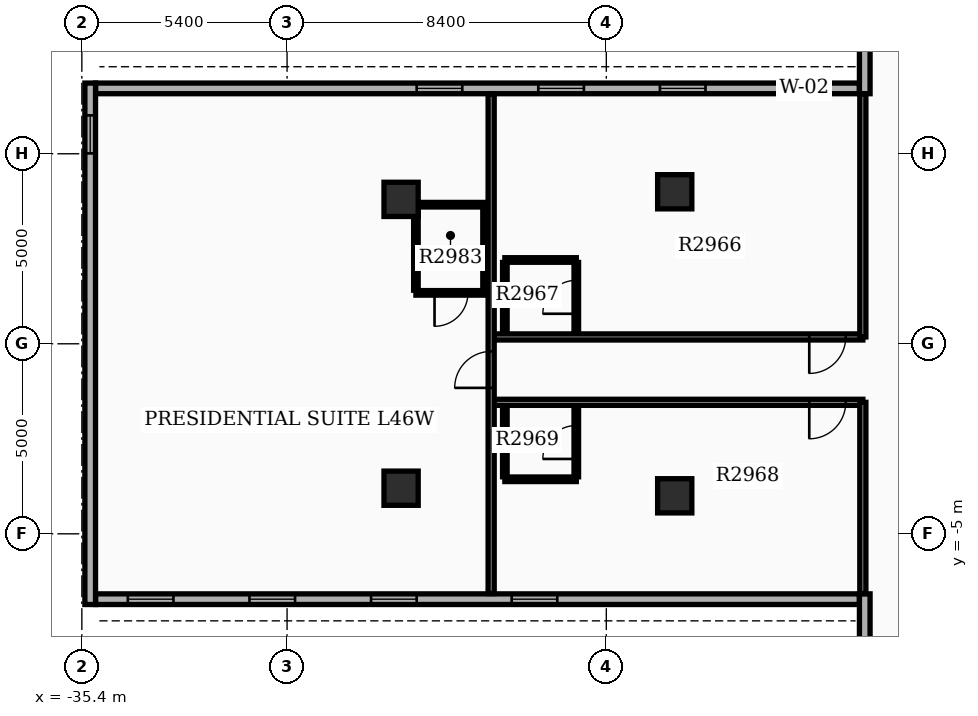
"""IFC4 building model, lengths in metres.
Left out: names, types, materials, properties, quantities, classifications, styles, units other than length and angle.
Written with IfcOpenShell. Run it as: python <this file> out.ifc"""

import sys

from ifc_helpers import new_model, si_unit, direction, frame, frame_2d, origin, origin_2d, place, context, subcontext, project, spatial, rectangle, extrude, element, fill, save


model = new_model("IFC4")
c1 = context("Model", 3, precision=1e-05, world=origin(), true_north=direction((0.0, 1.0)))
c2 = subcontext(c1, "Body", "Model", "MODEL_VIEW")
j1 = project(units=[si_unit("LENGTHUNIT", "METRE"), si_unit("PLANEANGLEUNIT", "RADIAN")], contexts=[c1])
p1 = place(None, origin())
s1 = spatial("IfcSite", under=j1, at=p1, CompositionType="ELEMENT")
p2 = place(p1, origin())
s2 = spatial("IfcBuilding", under=s1, at=p2, CompositionType="ELEMENT")
p3 = place(p2, frame((0.0, 0.0, 183.9)))
s3 = spatial("IfcBuildingStorey", under=s2, at=p3, CompositionType="ELEMENT", Elevation=183.9)
for number, where, z_axis, x_axis in (
    (1, (-19.8, -4.0, 0.0), (0.0, 0.0, 1.0), (1.0, 0.0, 0.0)),
    (2, (-19.8, 4.0, 0.0), (0.0, 0.0, 1.0), (1.0, 0.0, 0.0)),
    (3, (-27.0, -3.8, 0.0), (0.0, 0.0, 1.0), (1.0, 0.0, 0.0)),
    (4, (-27.0, 3.8, 0.0), (0.0, 0.0, 1.0), (1.0, 0.0, 0.0)),
):
    element("IfcColumn", number, at=place(p3, frame(where, z_axis=z_axis, x_axis=x_axis)), inside=s3, PredefinedType="COLUMN", context=c2, shape_type="SweptSolid", body=[
        extrude(rectangle(XDim=0.9, YDim=0.9, at=origin_2d()), origin(), (0.0, 0.0, 1.0), 3.9),
    ])
p4 = place(p3, frame((-14.94, 6.72, 0.0), z_axis=(0.0, 0.0, 1.0), x_axis=(-1.0, 0.0, 0.0)))
e5 = element("IfcWall", 5, at=p4, inside=s3, PredefinedType="STANDARD", context=c2, shape_type="SweptSolid", body=[
    extrude(rectangle(XDim=20.1, YDim=0.28, at=frame_2d((10.05, 0.0))), origin(), (0.0, 0.0, 1.0), 2.97),
])
p5 = place(p4, frame((0.85, 0.0, 0.8)))
e6 = element("IfcOpeningElement", 6, at=p5, cuts=e5, PredefinedType="OPENING", context=c2, shape_type="SweptSolid", body=[
    extrude(rectangle(XDim=1.2, YDim=1.6, at=frame_2d((0.6, 0.8))), frame((0.0, 0.15, 0.0), z_axis=(0.0, -1.0, 0.0), x_axis=(1.0, 0.0, 0.0)), (0.0, 0.0, 1.0), 0.3),
])
p6 = place(p4, frame((4.05, 0.0, 0.8)))
e7 = element("IfcOpeningElement", 7, at=p6, cuts=e5, PredefinedType="OPENING", context=c2, shape_type="SweptSolid", body=[
    extrude(rectangle(XDim=1.2, YDim=1.6, at=frame_2d((0.6, 0.8))), frame((0.0, 0.15, 0.0), z_axis=(0.0, -1.0, 0.0), x_axis=(1.0, 0.0, 0.0)), (0.0, 0.0, 1.0), 0.3),
])
p7 = place(p4, frame((7.25, 0.0, 0.8)))
e8 = element("IfcOpeningElement", 8, at=p7, cuts=e5, PredefinedType="OPENING", context=c2, shape_type="SweptSolid", body=[
    extrude(rectangle(XDim=1.2, YDim=1.6, at=frame_2d((0.6, 0.8))), frame((0.0, 0.15, 0.0), z_axis=(0.0, -1.0, 0.0), x_axis=(1.0, 0.0, 0.0)), (0.0, 0.0, 1.0), 0.3),
])
p8 = place(p4, frame((10.45, 0.0, 0.8)))
e9 = element("IfcOpeningElement", 9, at=p8, cuts=e5, PredefinedType="OPENING", context=c2, shape_type="SweptSolid", body=[
    extrude(rectangle(XDim=1.2, YDim=1.6, at=frame_2d((0.6, 0.8))), frame((0.0, 0.15, 0.0), z_axis=(0.0, -1.0, 0.0), x_axis=(1.0, 0.0, 0.0)), (0.0, 0.0, 1.0), 0.3),
])
p9 = place(p3, frame((-35.04, -6.72, 0.0), z_axis=(0.0, 0.0, 1.0), x_axis=(1.0, 0.0, 0.0)))
e10 = element("IfcWall", 10, at=p9, inside=s3, PredefinedType="STANDARD", context=c2, shape_type="SweptSolid", body=[
    extrude(rectangle(XDim=20.1, YDim=0.28, at=frame_2d((10.05, 0.0))), origin(), (0.0, 0.0, 1.0), 2.97),
])
p10 = place(p9, frame((0.85, 0.0, 0.8)))
e11 = element("IfcOpeningElement", 11, at=p10, cuts=e10, PredefinedType="OPENING", context=c2, shape_type="SweptSolid", body=[
    extrude(rectangle(XDim=1.2, YDim=1.6, at=frame_2d((0.6, 0.8))), frame((0.0, 0.15, 0.0), z_axis=(0.0, -1.0, 0.0), x_axis=(1.0, 0.0, 0.0)), (0.0, 0.0, 1.0), 0.3),
])
p11 = place(p9, frame((4.05, 0.0, 0.8)))
e12 = element("IfcOpeningElement", 12, at=p11, cuts=e10, PredefinedType="OPENING", context=c2, shape_type="SweptSolid", body=[
    extrude(rectangle(XDim=1.2, YDim=1.6, at=frame_2d((0.6, 0.8))), frame((0.0, 0.15, 0.0), z_axis=(0.0, -1.0, 0.0), x_axis=(1.0, 0.0, 0.0)), (0.0, 0.0, 1.0), 0.3),
])
p12 = place(p9, frame((7.25, 0.0, 0.8)))
e13 = element("IfcOpeningElement", 13, at=p12, cuts=e10, PredefinedType="OPENING", context=c2, shape_type="SweptSolid", body=[
    extrude(rectangle(XDim=1.2, YDim=1.6, at=frame_2d((0.6, 0.8))), frame((0.0, 0.15, 0.0), z_axis=(0.0, -1.0, 0.0), x_axis=(1.0, 0.0, 0.0)), (0.0, 0.0, 1.0), 0.3),
])
p13 = place(p9, frame((10.95, 0.0, 0.8)))
e14 = element("IfcOpeningElement", 14, at=p13, cuts=e10, PredefinedType="OPENING", context=c2, shape_type="SweptSolid", body=[
    extrude(rectangle(XDim=1.2, YDim=1.6, at=frame_2d((0.6, 0.8))), frame((0.0, 0.15, 0.0), z_axis=(0.0, -1.0, 0.0), x_axis=(1.0, 0.0, 0.0)), (0.0, 0.0, 1.0), 0.3),
])
p14 = place(p3, frame((-35.18, 6.86, 0.0), z_axis=(0.0, 0.0, 1.0), x_axis=(0.0, -1.0, 0.0)))
e15 = element("IfcWall", 15, at=p14, inside=s3, PredefinedType="STANDARD", context=c2, shape_type="SweptSolid", body=[
    extrude(rectangle(XDim=13.72, YDim=0.28, at=frame_2d((6.86, 0.0))), origin(), (0.0, 0.0, 1.0), 2.97),
])
p15 = place(p14, frame((0.85, 0.0, 0.85)))
e16 = element("IfcOpeningElement", 16, at=p15, cuts=e15, PredefinedType="OPENING", context=c2, shape_type="SweptSolid", body=[
    extrude(rectangle(XDim=1.0, YDim=1.5, at=frame_2d((0.5, 0.75))), frame((0.0, 0.15, 0.0), z_axis=(0.0, -1.0, 0.0), x_axis=(1.0, 0.0, 0.0)), (0.0, 0.0, 1.0), 0.3),
])
for number, where, z_axis, x_axis in (
    (17, (-14.8, 6.58, 0.0), (0.0, 0.0, 1.0), (0.0, 1.0, 0.0)),
    (18, (-14.8, -6.58, 0.0), (0.0, 0.0, 1.0), (0.0, -1.0, 0.0)),
):
    element("IfcWall", number, at=place(p3, frame(where, z_axis=z_axis, x_axis=x_axis)), inside=s3, PredefinedType="STANDARD", context=c2, shape_type="SweptSolid", body=[
        extrude(rectangle(XDim=6.86, YDim=0.28, at=frame_2d((3.43, 0.0))), origin(), (0.0, 0.0, 1.0), 2.97),
    ])
p16 = place(p3, frame((-14.85, 0.18, 0.0), z_axis=(0.0, 0.0, 1.0), x_axis=(-1.0, 0.0, 0.0)))
e19 = element("IfcWall", 19, at=p16, inside=s3, PredefinedType="PARTITIONING", context=c2, shape_type="SweptSolid", body=[
    extrude(rectangle(XDim=9.7, YDim=0.16, at=frame_2d((4.85, 0.0))), origin(), (0.0, 0.0, 1.0), 2.96),
])
p17 = place(p16, frame((0.45, 0.0, 0.0)))
e20 = element("IfcOpeningElement", 20, at=p17, cuts=e19, PredefinedType="OPENING", context=c2, shape_type="SweptSolid", body=[
    extrude(rectangle(XDim=0.96, YDim=2.15, at=frame_2d((0.48, 1.075))), frame((0.0, 0.09, 0.0), z_axis=(0.0, -1.0, 0.0), x_axis=(1.0, 0.0, 0.0)), (0.0, 0.0, 1.0), 0.18),
])
p18 = place(p3, frame((-14.85, 0.18, 0.0), z_axis=(0.0, 0.0, 1.0), x_axis=(0.0, 1.0, 0.0)))
e21 = element("IfcWall", 21, at=p18, inside=s3, PredefinedType="PARTITIONING", context=c2, shape_type="SweptSolid", body=[
    extrude(rectangle(XDim=6.392, YDim=0.16, at=frame_2d((3.196, 0.0))), origin(), (0.0, 0.0, 1.0), 2.96),
])
p19 = place(p3, frame((-22.39, 0.32, 0.0), z_axis=(0.0, 0.0, 1.0), x_axis=(0.0, 1.0, 0.0)))
e22 = element("IfcWall", 22, at=p19, inside=s3, PredefinedType="PARTITIONING", context=c2, shape_type="SweptSolid", body=[
    extrude(rectangle(XDim=1.82, YDim=0.12, at=frame_2d((0.91, 0.0))), origin(), (0.0, 0.0, 1.0), 2.96),
])
p20 = place(p19, frame((0.47, 0.0, 0.0)))
e23 = element("IfcOpeningElement", 23, at=p20, cuts=e22, PredefinedType="OPENING", context=c2, shape_type="SweptSolid", body=[
    extrude(rectangle(XDim=0.88, YDim=2.1, at=frame_2d((0.44, 1.05))), frame((0.0, 0.07, 0.0), z_axis=(0.0, -1.0, 0.0), x_axis=(1.0, 0.0, 0.0)), (0.0, 0.0, 1.0), 0.14),
])
p21 = place(p3, frame((-24.27, 0.32, 0.0), z_axis=(0.0, 0.0, 1.0), x_axis=(0.0, 1.0, 0.0)))
e24 = element("IfcWall", 24, at=p21, inside=s3, PredefinedType="PARTITIONING", context=c2, shape_type="SweptSolid", body=[
    extrude(rectangle(XDim=1.82, YDim=0.12, at=frame_2d((0.91, 0.0))), origin(), (0.0, 0.0, 1.0), 2.96),
])
p22 = place(p3, frame((-22.39, 2.205, 0.0), z_axis=(0.0, 0.0, 1.0), x_axis=(-1.0, 0.0, 0.0)))
e25 = element("IfcWall", 25, at=p22, inside=s3, PredefinedType="PARTITIONING", context=c2, shape_type="SweptSolid", body=[
    extrude(rectangle(XDim=1.88, YDim=0.12, at=frame_2d((0.94, 0.0))), origin(), (0.0, 0.0, 1.0), 2.96),
])
p23 = place(p3, frame((-14.85, -1.54, 0.0), z_axis=(0.0, 0.0, 1.0), x_axis=(-1.0, 0.0, 0.0)))
e26 = element("IfcWall", 26, at=p23, inside=s3, PredefinedType="PARTITIONING", context=c2, shape_type="SweptSolid", body=[
    extrude(rectangle(XDim=9.7, YDim=0.16, at=frame_2d((4.85, 0.0))), origin(), (0.0, 0.0, 1.0), 2.96),
])
p24 = place(p23, frame((0.45, 0.0, 0.0)))
e27 = element("IfcOpeningElement", 27, at=p24, cuts=e26, PredefinedType="OPENING", context=c2, shape_type="SweptSolid", body=[
    extrude(rectangle(XDim=0.96, YDim=2.15, at=frame_2d((0.48, 1.075))), frame((0.0, 0.09, 0.0), z_axis=(0.0, -1.0, 0.0), x_axis=(1.0, 0.0, 0.0)), (0.0, 0.0, 1.0), 0.18),
])
p25 = place(p3, frame((-14.85, -1.54, 0.0), z_axis=(0.0, 0.0, 1.0), x_axis=(0.0, -1.0, 0.0)))
e28 = element("IfcWall", 28, at=p25, inside=s3, PredefinedType="PARTITIONING", context=c2, shape_type="SweptSolid", body=[
    extrude(rectangle(XDim=5.032, YDim=0.16, at=frame_2d((2.516, 0.0))), origin(), (0.0, 0.0, 1.0), 2.96),
])
p26 = place(p3, frame((-22.39, -3.5, 0.0), z_axis=(0.0, 0.0, 1.0), x_axis=(0.0, 1.0, 0.0)))
e29 = element("IfcWall", 29, at=p26, inside=s3, PredefinedType="PARTITIONING", context=c2, shape_type="SweptSolid", body=[
    extrude(rectangle(XDim=1.82, YDim=0.12, at=frame_2d((0.91, 0.0))), origin(), (0.0, 0.0, 1.0), 2.96),
])
p27 = place(p26, frame((0.47, 0.0, 0.0)))
e30 = element("IfcOpeningElement", 30, at=p27, cuts=e29, PredefinedType="OPENING", context=c2, shape_type="SweptSolid", body=[
    extrude(rectangle(XDim=0.88, YDim=2.1, at=frame_2d((0.44, 1.05))), frame((0.0, 0.07, 0.0), z_axis=(0.0, -1.0, 0.0), x_axis=(1.0, 0.0, 0.0)), (0.0, 0.0, 1.0), 0.14),
])
p28 = place(p3, frame((-24.27, -3.5, 0.0), z_axis=(0.0, 0.0, 1.0), x_axis=(0.0, 1.0, 0.0)))
e31 = element("IfcWall", 31, at=p28, inside=s3, PredefinedType="PARTITIONING", context=c2, shape_type="SweptSolid", body=[
    extrude(rectangle(XDim=1.82, YDim=0.12, at=frame_2d((0.91, 0.0))), origin(), (0.0, 0.0, 1.0), 2.96),
])
p29 = place(p3, frame((-22.39, -3.565, 0.0), z_axis=(0.0, 0.0, 1.0), x_axis=(-1.0, 0.0, 0.0)))
e32 = element("IfcWall", 32, at=p29, inside=s3, PredefinedType="PARTITIONING", context=c2, shape_type="SweptSolid", body=[
    extrude(rectangle(XDim=1.88, YDim=0.12, at=frame_2d((0.94, 0.0))), origin(), (0.0, 0.0, 1.0), 2.96),
])
p30 = place(p3, frame((-24.63, -6.572, 0.0), z_axis=(0.0, 0.0, 1.0), x_axis=(0.0, 1.0, 0.0)))
e33 = element("IfcWall", 33, at=p30, inside=s3, PredefinedType="PARTITIONING", context=c2, shape_type="SweptSolid", body=[
    extrude(rectangle(XDim=13.144, YDim=0.16, at=frame_2d((6.572, 0.0))), origin(), (0.0, 0.0, 1.0), 2.96),
])
p31 = place(p30, frame((5.412, 0.0, 0.0)))
e34 = element("IfcOpeningElement", 34, at=p31, cuts=e33, PredefinedType="OPENING", context=c2, shape_type="SweptSolid", body=[
    extrude(rectangle(XDim=0.96, YDim=2.15, at=frame_2d((0.48, 1.075))), frame((0.0, 0.09, 0.0), z_axis=(0.0, -1.0, 0.0), x_axis=(1.0, 0.0, 0.0)), (0.0, 0.0, 1.0), 0.18),
])
for number, where, z_axis, x_axis in (
    (35, (-24.79, 1.41, 0.0), (0.0, 0.0, 1.0), (0.0, 1.0, 0.0)),
    (36, (-26.61, 1.41, 0.0), (0.0, 0.0, 1.0), (0.0, 1.0, 0.0)),
):
    element("IfcWall", number, at=place(p3, frame(where, z_axis=z_axis, x_axis=x_axis)), inside=s3, PredefinedType="PARTITIONING", context=c2, shape_type="SweptSolid", body=[
        extrude(rectangle(XDim=2.18, YDim=0.12, at=frame_2d((1.09, 0.0))), origin(), (0.0, 0.0, 1.0), 2.96),
    ])
p32 = place(p3, frame((-24.79, 1.34, 0.0), z_axis=(0.0, 0.0, 1.0), x_axis=(-1.0, 0.0, 0.0)))
e37 = element("IfcWall", 37, at=p32, inside=s3, PredefinedType="PARTITIONING", context=c2, shape_type="SweptSolid", body=[
    extrude(rectangle(XDim=1.82, YDim=0.12, at=frame_2d((0.91, 0.0))), origin(), (0.0, 0.0, 1.0), 2.96),
])
p33 = place(p32, frame((0.45, 0.0, 0.0)))
e38 = element("IfcOpeningElement", 38, at=p33, cuts=e37, PredefinedType="OPENING", context=c2, shape_type="SweptSolid", body=[
    extrude(rectangle(XDim=0.88, YDim=2.1, at=frame_2d((0.44, 1.05))), frame((0.0, 0.07, 0.0), z_axis=(0.0, -1.0, 0.0), x_axis=(1.0, 0.0, 0.0)), (0.0, 0.0, 1.0), 0.14),
])
p34 = place(p3, frame((-24.79, 3.66, 0.0), z_axis=(0.0, 0.0, 1.0), x_axis=(-1.0, 0.0, 0.0)))
e39 = element("IfcWall", 39, at=p34, inside=s3, PredefinedType="PARTITIONING", context=c2, shape_type="SweptSolid", body=[
    extrude(rectangle(XDim=1.82, YDim=0.12, at=frame_2d((0.91, 0.0))), origin(), (0.0, 0.0, 1.0), 2.96),
])
p35 = place(p5, origin())
e40 = element("IfcWindow", 40, at=p35, inside=s3, PartitioningType="SINGLE_PANEL", PredefinedType="WINDOW", context=c2, shape_type="SweptSolid", body=[
    extrude(rectangle(XDim=1.2, YDim=1.6, at=frame_2d((0.6, 0.8))), frame((0.0, 0.03, 0.0), z_axis=(0.0, -1.0, 0.0), x_axis=(1.0, 0.0, 0.0)), (0.0, 0.0, 1.0), 0.06),
])
fill(e6, e40)
p36 = place(p6, origin())
e41 = element("IfcWindow", 41, at=p36, inside=s3, PartitioningType="SINGLE_PANEL", PredefinedType="WINDOW", context=c2, shape_type="SweptSolid", body=[
    extrude(rectangle(XDim=1.2, YDim=1.6, at=frame_2d((0.6, 0.8))), frame((0.0, 0.03, 0.0), z_axis=(0.0, -1.0, 0.0), x_axis=(1.0, 0.0, 0.0)), (0.0, 0.0, 1.0), 0.06),
])
fill(e7, e41)
p37 = place(p7, origin())
e42 = element("IfcWindow", 42, at=p37, inside=s3, PartitioningType="SINGLE_PANEL", PredefinedType="WINDOW", context=c2, shape_type="SweptSolid", body=[
    extrude(rectangle(XDim=1.2, YDim=1.6, at=frame_2d((0.6, 0.8))), frame((0.0, 0.03, 0.0), z_axis=(0.0, -1.0, 0.0), x_axis=(1.0, 0.0, 0.0)), (0.0, 0.0, 1.0), 0.06),
])
fill(e8, e42)
p38 = place(p8, origin())
e43 = element("IfcWindow", 43, at=p38, inside=s3, PartitioningType="SINGLE_PANEL", PredefinedType="WINDOW", context=c2, shape_type="SweptSolid", body=[
    extrude(rectangle(XDim=1.2, YDim=1.6, at=frame_2d((0.6, 0.8))), frame((0.0, 0.03, 0.0), z_axis=(0.0, -1.0, 0.0), x_axis=(1.0, 0.0, 0.0)), (0.0, 0.0, 1.0), 0.06),
])
fill(e9, e43)
p39 = place(p10, origin())
e44 = element("IfcWindow", 44, at=p39, inside=s3, PartitioningType="SINGLE_PANEL", PredefinedType="WINDOW", context=c2, shape_type="SweptSolid", body=[
    extrude(rectangle(XDim=1.2, YDim=1.6, at=frame_2d((0.6, 0.8))), frame((0.0, 0.03, 0.0), z_axis=(0.0, -1.0, 0.0), x_axis=(1.0, 0.0, 0.0)), (0.0, 0.0, 1.0), 0.06),
])
fill(e11, e44)
p40 = place(p11, origin())
e45 = element("IfcWindow", 45, at=p40, inside=s3, PartitioningType="SINGLE_PANEL", PredefinedType="WINDOW", context=c2, shape_type="SweptSolid", body=[
    extrude(rectangle(XDim=1.2, YDim=1.6, at=frame_2d((0.6, 0.8))), frame((0.0, 0.03, 0.0), z_axis=(0.0, -1.0, 0.0), x_axis=(1.0, 0.0, 0.0)), (0.0, 0.0, 1.0), 0.06),
])
fill(e12, e45)
p41 = place(p12, origin())
e46 = element("IfcWindow", 46, at=p41, inside=s3, PartitioningType="SINGLE_PANEL", PredefinedType="WINDOW", context=c2, shape_type="SweptSolid", body=[
    extrude(rectangle(XDim=1.2, YDim=1.6, at=frame_2d((0.6, 0.8))), frame((0.0, 0.03, 0.0), z_axis=(0.0, -1.0, 0.0), x_axis=(1.0, 0.0, 0.0)), (0.0, 0.0, 1.0), 0.06),
])
fill(e13, e46)
p42 = place(p13, origin())
e47 = element("IfcWindow", 47, at=p42, inside=s3, PartitioningType="SINGLE_PANEL", PredefinedType="WINDOW", context=c2, shape_type="SweptSolid", body=[
    extrude(rectangle(XDim=1.2, YDim=1.6, at=frame_2d((0.6, 0.8))), frame((0.0, 0.03, 0.0), z_axis=(0.0, -1.0, 0.0), x_axis=(1.0, 0.0, 0.0)), (0.0, 0.0, 1.0), 0.06),
])
fill(e14, e47)
p43 = place(p15, origin())
e48 = element("IfcWindow", 48, at=p43, inside=s3, PartitioningType="SINGLE_PANEL", PredefinedType="WINDOW", context=c2, shape_type="SweptSolid", body=[
    extrude(rectangle(XDim=1.0, YDim=1.5, at=frame_2d((0.5, 0.75))), frame((0.0, 0.03, 0.0), z_axis=(0.0, -1.0, 0.0), x_axis=(1.0, 0.0, 0.0)), (0.0, 0.0, 1.0), 0.06),
])
fill(e16, e48)
p44 = place(p17, origin())
e49 = element("IfcDoor", 49, at=p44, inside=s3, OperationType="SINGLE_SWING_RIGHT", PredefinedType="DOOR", context=c2, shape_type="SweptSolid", body=[
    extrude(rectangle(XDim=0.96, YDim=2.15, at=frame_2d((0.48, 1.075))), frame((0.0, 0.025, 0.0), z_axis=(0.0, -1.0, 0.0), x_axis=(1.0, 0.0, 0.0)), (0.0, 0.0, 1.0), 0.05),
])
fill(e20, e49)
p45 = place(p20, origin())
e50 = element("IfcDoor", 50, at=p45, inside=s3, OperationType="SINGLE_SWING_LEFT", PredefinedType="DOOR", context=c2, shape_type="SweptSolid", body=[
    extrude(rectangle(XDim=0.88, YDim=2.1, at=frame_2d((0.44, 1.05))), frame((0.0, 0.025, 0.0), z_axis=(0.0, -1.0, 0.0), x_axis=(1.0, 0.0, 0.0)), (0.0, 0.0, 1.0), 0.05),
])
fill(e23, e50)
p46 = place(p24, origin())
e51 = element("IfcDoor", 51, at=p46, inside=s3, OperationType="SINGLE_SWING_RIGHT", PredefinedType="DOOR", context=c2, shape_type="SweptSolid", body=[
    extrude(rectangle(XDim=0.96, YDim=2.15, at=frame_2d((0.48, 1.075))), frame((0.0, 0.025, 0.0), z_axis=(0.0, -1.0, 0.0), x_axis=(1.0, 0.0, 0.0)), (0.0, 0.0, 1.0), 0.05),
])
fill(e27, e51)
p47 = place(p27, origin())
e52 = element("IfcDoor", 52, at=p47, inside=s3, OperationType="SINGLE_SWING_LEFT", PredefinedType="DOOR", context=c2, shape_type="SweptSolid", body=[
    extrude(rectangle(XDim=0.88, YDim=2.1, at=frame_2d((0.44, 1.05))), frame((0.0, 0.025, 0.0), z_axis=(0.0, -1.0, 0.0), x_axis=(1.0, 0.0, 0.0)), (0.0, 0.0, 1.0), 0.05),
])
fill(e30, e52)
p48 = place(p31, origin())
e53 = element("IfcDoor", 53, at=p48, inside=s3, OperationType="SINGLE_SWING_LEFT", PredefinedType="DOOR", context=c2, shape_type="SweptSolid", body=[
    extrude(rectangle(XDim=0.96, YDim=2.15, at=frame_2d((0.48, 1.075))), frame((0.0, 0.025, 0.0), z_axis=(0.0, -1.0, 0.0), x_axis=(1.0, 0.0, 0.0)), (0.0, 0.0, 1.0), 0.05),
])
fill(e34, e53)
p49 = place(p33, origin())
e54 = element("IfcDoor", 54, at=p49, inside=s3, OperationType="SINGLE_SWING_RIGHT", PredefinedType="DOOR", context=c2, shape_type="SweptSolid", body=[
    extrude(rectangle(XDim=0.88, YDim=2.1, at=frame_2d((0.44, 1.05))), frame((0.0, 0.025, 0.0), z_axis=(0.0, -1.0, 0.0), x_axis=(1.0, 0.0, 0.0)), (0.0, 0.0, 1.0), 0.05),
])
fill(e38, e54)
save(model, sys.argv[1])
